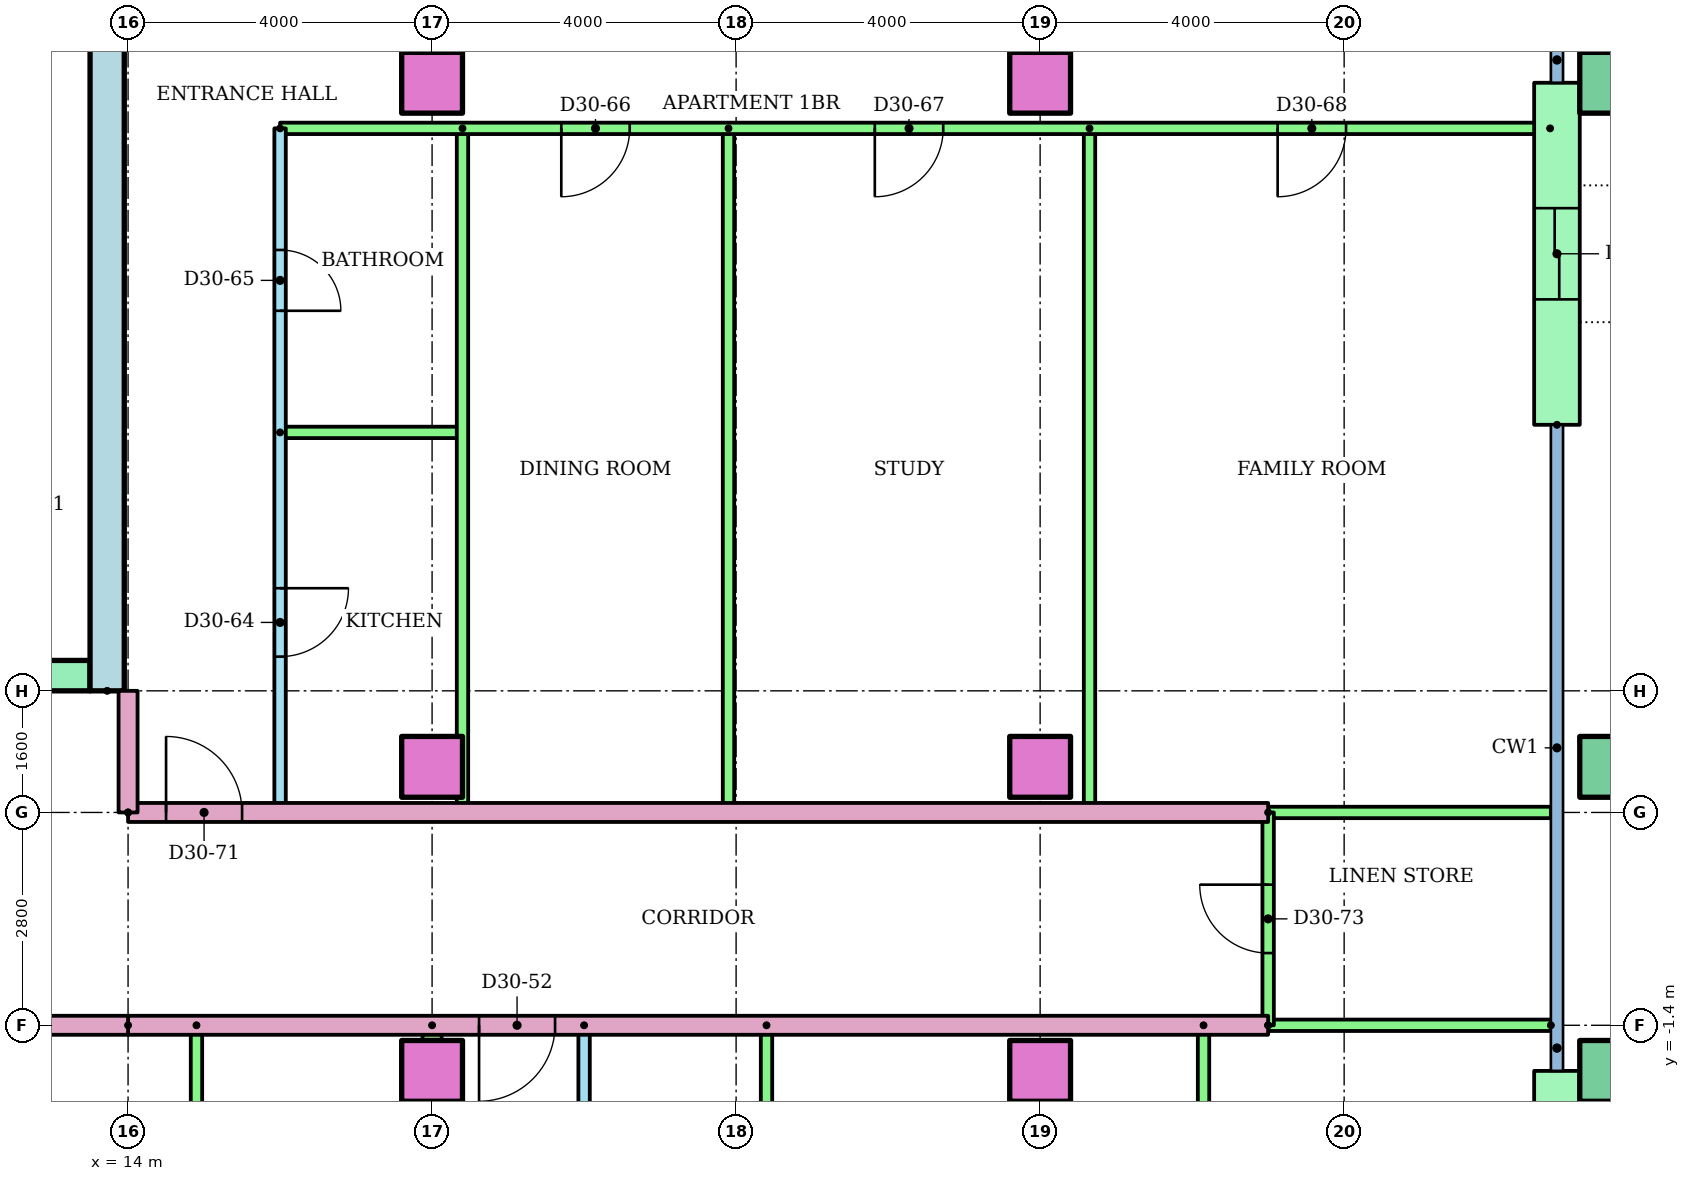
"""IFC4 building model, lengths in metres.
Left out: names, types, materials, properties, quantities, classifications, styles, units other than length and angle.
Written with IfcOpenShell. Run it as: python <this file> out.ifc"""

import sys

from ifc_helpers import new_model, si_unit, direction, frame, frame_2d, origin, origin_2d, place, context, subcontext, project, spatial, rectangle, hollow_rectangle, extrude, element, fill, save


model = new_model("IFC4")
c1 = context("Model", 3, precision=1e-05, world=origin(), true_north=direction((0.0, 1.0)))
c2 = subcontext(c1, "Body", "Model", "MODEL_VIEW")
j1 = project(units=[si_unit("LENGTHUNIT", "METRE"), si_unit("PLANEANGLEUNIT", "RADIAN")], contexts=[c1])
p1 = place(None, origin())
s1 = spatial("IfcSite", under=j1, at=p1, CompositionType="ELEMENT")
p2 = place(p1, origin())
s2 = spatial("IfcBuilding", under=s1, at=p2, CompositionType="ELEMENT")
p3 = place(p2, frame((0.0, 0.0, 119.8)))
s3 = spatial("IfcBuildingStorey", under=s2, at=p3, CompositionType="ELEMENT", Elevation=119.8)
for number, where in (
    (1, (18.0, -2.0, 0.0)),
    (2, (26.0, -2.0, 0.0)),
):
    element("IfcColumn", number, at=place(p3, frame(where)), inside=s3, PredefinedType="COLUMN", context=c2, shape_type="SweptSolid", body=[
        extrude(rectangle(XDim=0.8, YDim=0.8, at=origin_2d()), origin(), (0.0, 0.0, 1.0), 3.2),
    ])
p4 = place(p3, frame((33.5, -2.0, 0.0)))
e3 = element("IfcColumn", 3, at=p4, inside=s3, PredefinedType="COLUMN", context=c2, shape_type="SweptSolid", body=[
    extrude(hollow_rectangle(XDim=0.8, YDim=0.8, WallThickness=0.04, at=origin_2d()), origin(), (0.0, 0.0, 1.0), 3.2),
])
for number, where in (
    (4, (18.0, 2.0, 0.0)),
    (5, (26.0, 2.0, 0.0)),
):
    element("IfcColumn", number, at=place(p3, frame(where)), inside=s3, PredefinedType="COLUMN", context=c2, shape_type="SweptSolid", body=[
        extrude(rectangle(XDim=0.8, YDim=0.8, at=origin_2d()), origin(), (0.0, 0.0, 1.0), 3.2),
    ])
p5 = place(p3, frame((33.5, 2.0, 0.0)))
e6 = element("IfcColumn", 6, at=p5, inside=s3, PredefinedType="COLUMN", context=c2, shape_type="SweptSolid", body=[
    extrude(hollow_rectangle(XDim=0.8, YDim=0.8, WallThickness=0.04, at=origin_2d()), origin(), (0.0, 0.0, 1.0), 3.2),
])
for number, where in (
    (7, (18.0, 11.0, 0.0)),
    (8, (26.0, 11.0, 0.0)),
):
    element("IfcColumn", number, at=place(p3, frame(where)), inside=s3, PredefinedType="COLUMN", context=c2, shape_type="SweptSolid", body=[
        extrude(rectangle(XDim=0.8, YDim=0.8, at=origin_2d()), origin(), (0.0, 0.0, 1.0), 3.2),
    ])
p6 = place(p3, frame((33.5, 11.0, 0.0)))
e9 = element("IfcColumn", 9, at=p6, inside=s3, PredefinedType="COLUMN", context=c2, shape_type="SweptSolid", body=[
    extrude(hollow_rectangle(XDim=0.8, YDim=0.8, WallThickness=0.04, at=origin_2d()), origin(), (0.0, 0.0, 1.0), 3.2),
])
p7 = place(p3, frame((32.8, -5.7, 0.0), z_axis=(0.0, 0.0, 1.0), x_axis=(0.0, 1.0, 0.0)))
e10 = element("IfcWall", 10, at=p7, inside=s3, PredefinedType="STANDARD", context=c2, shape_type="SweptSolid", body=[
    extrude(rectangle(XDim=3.7, YDim=0.6, at=frame_2d((1.85, 0.0))), origin(), (0.0, 0.0, 1.0), 2.92),
])
p8 = place(p7, frame((1.25, 0.0, 0.0)))
e11 = element("IfcOpeningElement", 11, at=p8, cuts=e10, PredefinedType="OPENING", context=c2, shape_type="SweptSolid", body=[
    extrude(rectangle(XDim=1.2, YDim=2.1, at=frame_2d((0.6, 1.05))), frame((0.0, 0.31, 0.0), z_axis=(0.0, -1.0, 0.0), x_axis=(1.0, 0.0, 0.0)), (0.0, 0.0, 1.0), 0.62),
])
p9 = place(p3, frame((32.8, 6.5, 0.0), z_axis=(0.0, 0.0, 1.0), x_axis=(0.0, 1.0, 0.0)))
e12 = element("IfcWall", 12, at=p9, inside=s3, PredefinedType="STANDARD", context=c2, shape_type="SweptSolid", body=[
    extrude(rectangle(XDim=4.5, YDim=0.6, at=frame_2d((2.25, 0.0))), origin(), (0.0, 0.0, 1.0), 2.92),
])
p10 = place(p9, frame((1.65, 0.0, 0.0)))
e13 = element("IfcOpeningElement", 13, at=p10, cuts=e12, PredefinedType="OPENING", context=c2, shape_type="SweptSolid", body=[
    extrude(rectangle(XDim=1.2, YDim=2.1, at=frame_2d((0.6, 1.05))), frame((0.0, 0.31, 0.0), z_axis=(0.0, -1.0, 0.0), x_axis=(1.0, 0.0, 0.0)), (0.0, 0.0, 1.0), 0.62),
])
p11 = place(p3, frame((13.725, 3.0, 0.0), z_axis=(0.0, 0.0, 1.0), x_axis=(0.0, 1.0, 0.0)))
e14 = element("IfcWall", 14, at=p11, inside=s3, PredefinedType="SHEAR", context=c2, shape_type="SweptSolid", body=[
    extrude(rectangle(XDim=17.0, YDim=0.45, at=frame_2d((8.5, 0.0))), origin(), (0.0, 0.0, 1.0), 2.92),
])
p12 = place(p3, frame((-13.5, 3.2, 0.0)))
e15 = element("IfcWall", 15, at=p12, inside=s3, PredefinedType="SHEAR", context=c2, shape_type="SweptSolid", body=[
    extrude(rectangle(XDim=27.0, YDim=0.4, at=frame_2d((13.5, 0.0))), origin(), (0.0, 0.0, 1.0), 2.92),
])
p13 = place(p12, frame((6.861, 0.0, 0.0)))
e16 = element("IfcOpeningElement", 16, at=p13, cuts=e15, PredefinedType="OPENING", context=c2, shape_type="SweptSolid", body=[
    extrude(rectangle(XDim=1.1, YDim=2.1, at=frame_2d((0.55, 1.05))), frame((0.0, 0.21, 0.0), z_axis=(0.0, -1.0, 0.0), x_axis=(1.0, 0.0, 0.0)), (0.0, 0.0, 1.0), 0.42),
])
p14 = place(p12, frame((9.906, 0.0, 0.0)))
e17 = element("IfcOpeningElement", 17, at=p14, cuts=e15, PredefinedType="OPENING", context=c2, shape_type="SweptSolid", body=[
    extrude(rectangle(XDim=1.1, YDim=2.1, at=frame_2d((0.55, 1.05))), frame((0.0, 0.21, 0.0), z_axis=(0.0, -1.0, 0.0), x_axis=(1.0, 0.0, 0.0)), (0.0, 0.0, 1.0), 0.42),
])
p15 = place(p12, frame((15.994, 0.0, 0.0)))
e18 = element("IfcOpeningElement", 18, at=p15, cuts=e15, PredefinedType="OPENING", context=c2, shape_type="SweptSolid", body=[
    extrude(rectangle(XDim=1.1, YDim=2.1, at=frame_2d((0.55, 1.05))), frame((0.0, 0.21, 0.0), z_axis=(0.0, -1.0, 0.0), x_axis=(1.0, 0.0, 0.0)), (0.0, 0.0, 1.0), 0.42),
])
p16 = place(p12, frame((19.039, 0.0, 0.0)))
e19 = element("IfcOpeningElement", 19, at=p16, cuts=e15, PredefinedType="OPENING", context=c2, shape_type="SweptSolid", body=[
    extrude(rectangle(XDim=1.1, YDim=2.1, at=frame_2d((0.55, 1.05))), frame((0.0, 0.21, 0.0), z_axis=(0.0, -1.0, 0.0), x_axis=(1.0, 0.0, 0.0)), (0.0, 0.0, 1.0), 0.42),
])
p17 = place(p12, frame((12.6, 0.0, 0.0)))
e20 = element("IfcOpeningElement", 20, at=p17, cuts=e15, PredefinedType="OPENING", context=c2, shape_type="SweptSolid", body=[
    extrude(rectangle(XDim=1.8, YDim=2.1, at=frame_2d((0.9, 1.05))), frame((0.0, 0.21, 0.0), z_axis=(0.0, -1.0, 0.0), x_axis=(1.0, 0.0, 0.0)), (0.0, 0.0, 1.0), 0.42),
])
p18 = place(p3, frame((14.9, -1.4, 0.0), z_axis=(0.0, 0.0, 1.0), x_axis=(0.0, -1.0, 0.0)))
e21 = element("IfcWall", 21, at=p18, inside=s3, PredefinedType="PARTITIONING", context=c2, shape_type="SweptSolid", body=[
    extrude(rectangle(XDim=6.6, YDim=0.15, at=frame_2d((3.3, 0.0))), origin(), (0.0, 0.0, 1.0), 2.4),
])
p19 = place(p3, frame((20.0, -1.4, 0.0), z_axis=(0.0, 0.0, 1.0), x_axis=(0.0, -1.0, 0.0)))
e22 = element("IfcWall", 22, at=p19, inside=s3, PredefinedType="PARTITIONING", context=c2, shape_type="SweptSolid", body=[
    extrude(rectangle(XDim=6.6, YDim=0.15, at=frame_2d((3.3, 0.0))), origin(), (0.0, 0.0, 1.0), 2.4),
])
p20 = place(p19, frame((1.425, 0.0, 0.0)))
e23 = element("IfcOpeningElement", 23, at=p20, cuts=e22, PredefinedType="OPENING", context=c2, shape_type="SweptSolid", body=[
    extrude(rectangle(XDim=0.9, YDim=2.1, at=frame_2d((0.45, 1.05))), frame((0.0, 0.085, 0.0), z_axis=(0.0, -1.0, 0.0), x_axis=(1.0, 0.0, 0.0)), (0.0, 0.0, 1.0), 0.17),
])
p21 = place(p19, frame((4.775, 0.0, 0.0)))
e24 = element("IfcOpeningElement", 24, at=p21, cuts=e22, PredefinedType="OPENING", context=c2, shape_type="SweptSolid", body=[
    extrude(rectangle(XDim=0.8, YDim=2.1, at=frame_2d((0.4, 1.05))), frame((0.0, 0.085, 0.0), z_axis=(0.0, -1.0, 0.0), x_axis=(1.0, 0.0, 0.0)), (0.0, 0.0, 1.0), 0.17),
])
for number, where, z_axis, x_axis in (
    (25, (22.4, -1.4, 0.0), (0.0, 0.0, 1.0), (0.0, -1.0, 0.0)),
    (26, (28.15, -1.4, 0.0), (0.0, 0.0, 1.0), (0.0, -1.0, 0.0)),
):
    element("IfcWall", number, at=place(p3, frame(where, z_axis=z_axis, x_axis=x_axis)), inside=s3, PredefinedType="PARTITIONING", context=c2, shape_type="SweptSolid", body=[
        extrude(rectangle(XDim=6.6, YDim=0.15, at=frame_2d((3.3, 0.0))), origin(), (0.0, 0.0, 1.0), 2.4),
    ])
p22 = place(p3, frame((18.0, -1.4, 0.0), z_axis=(0.0, 0.0, 1.0), x_axis=(0.0, -1.0, 0.0)))
e27 = element("IfcWall", 27, at=p22, inside=s3, PredefinedType="PARTITIONING", context=c2, shape_type="SweptSolid", body=[
    extrude(rectangle(XDim=14.91, YDim=0.25, at=frame_2d((7.455, 0.0))), origin(), (0.0, 0.0, 1.0), 2.4),
])
p23 = place(p3, frame((29.0, -1.4, 0.0), z_axis=(0.0, 0.0, 1.0), x_axis=(-1.0, 0.0, 0.0)))
e28 = element("IfcWall", 28, at=p23, inside=s3, PredefinedType="PARTITIONING", context=c2, shape_type="SweptSolid", body=[
    extrude(rectangle(XDim=15.0, YDim=0.25, at=frame_2d((7.5, 0.0))), origin(), (0.0, 0.0, 1.0), 2.4),
])
p24 = place(p23, frame((9.382, 0.0, 0.0)))
e29 = element("IfcOpeningElement", 29, at=p24, cuts=e28, PredefinedType="OPENING", context=c2, shape_type="SweptSolid", body=[
    extrude(rectangle(XDim=1.0, YDim=2.1, at=frame_2d((0.5, 1.05))), frame((0.0, 0.135, 0.0), z_axis=(0.0, -1.0, 0.0), x_axis=(1.0, 0.0, 0.0)), (0.0, 0.0, 1.0), 0.27),
])
p25 = place(p3, frame((32.72, -1.4, 0.0), z_axis=(0.0, 0.0, 1.0), x_axis=(-1.0, 0.0, 0.0)))
e30 = element("IfcWall", 30, at=p25, inside=s3, PredefinedType="PARTITIONING", context=c2, shape_type="SweptSolid", body=[
    extrude(rectangle(XDim=3.72, YDim=0.15, at=frame_2d((1.86, 0.0))), origin(), (0.0, 0.0, 1.0), 2.4),
])
p26 = place(p3, frame((16.0, 10.4, 0.0), z_axis=(0.0, 0.0, 1.0), x_axis=(0.0, -1.0, 0.0)))
e31 = element("IfcWall", 31, at=p26, inside=s3, PredefinedType="PARTITIONING", context=c2, shape_type="SweptSolid", body=[
    extrude(rectangle(XDim=9.0, YDim=0.15, at=frame_2d((4.5, 0.0))), origin(), (0.0, 0.0, 1.0), 2.4),
])
p27 = place(p26, frame((6.05, 0.0, 0.0)))
e32 = element("IfcOpeningElement", 32, at=p27, cuts=e31, PredefinedType="OPENING", context=c2, shape_type="SweptSolid", body=[
    extrude(rectangle(XDim=0.9, YDim=2.1, at=frame_2d((0.45, 1.05))), frame((0.0, 0.085, 0.0), z_axis=(0.0, -1.0, 0.0), x_axis=(1.0, 0.0, 0.0)), (0.0, 0.0, 1.0), 0.17),
])
p28 = place(p26, frame((1.6, 0.0, 0.0)))
e33 = element("IfcOpeningElement", 33, at=p28, cuts=e31, PredefinedType="OPENING", context=c2, shape_type="SweptSolid", body=[
    extrude(rectangle(XDim=0.8, YDim=2.1, at=frame_2d((0.4, 1.05))), frame((0.0, 0.085, 0.0), z_axis=(0.0, -1.0, 0.0), x_axis=(1.0, 0.0, 0.0)), (0.0, 0.0, 1.0), 0.17),
])
p29 = place(p3, frame((16.0, 6.4, 0.0)))
e34 = element("IfcWall", 34, at=p29, inside=s3, PredefinedType="PARTITIONING", context=c2, shape_type="SweptSolid", body=[
    extrude(rectangle(XDim=2.4, YDim=0.15, at=frame_2d((1.2, 0.0))), origin(), (0.0, 0.0, 1.0), 2.4),
])
for number, where, z_axis, x_axis in (
    (35, (18.4, 10.4, 0.0), (0.0, 0.0, 1.0), (0.0, -1.0, 0.0)),
    (36, (21.9, 10.4, 0.0), (0.0, 0.0, 1.0), (0.0, -1.0, 0.0)),
    (37, (26.65, 10.4, 0.0), (0.0, 0.0, 1.0), (0.0, -1.0, 0.0)),
):
    element("IfcWall", number, at=place(p3, frame(where, z_axis=z_axis, x_axis=x_axis)), inside=s3, PredefinedType="PARTITIONING", context=c2, shape_type="SweptSolid", body=[
        extrude(rectangle(XDim=9.0, YDim=0.15, at=frame_2d((4.5, 0.0))), origin(), (0.0, 0.0, 1.0), 2.4),
    ])
p30 = place(p3, frame((32.71, 10.4, 0.0), z_axis=(0.0, 0.0, 1.0), x_axis=(-1.0, 0.0, 0.0)))
e38 = element("IfcWall", 38, at=p30, inside=s3, PredefinedType="PARTITIONING", context=c2, shape_type="SweptSolid", body=[
    extrude(rectangle(XDim=16.71, YDim=0.15, at=frame_2d((8.355, 0.0))), origin(), (0.0, 0.0, 1.0), 2.4),
])
p31 = place(p30, frame((12.11, 0.0, 0.0)))
e39 = element("IfcOpeningElement", 39, at=p31, cuts=e38, PredefinedType="OPENING", context=c2, shape_type="SweptSolid", body=[
    extrude(rectangle(XDim=0.9, YDim=2.1, at=frame_2d((0.45, 1.05))), frame((0.0, 0.085, 0.0), z_axis=(0.0, -1.0, 0.0), x_axis=(1.0, 0.0, 0.0)), (0.0, 0.0, 1.0), 0.17),
])
p32 = place(p30, frame((7.985, 0.0, 0.0)))
e40 = element("IfcOpeningElement", 40, at=p32, cuts=e38, PredefinedType="OPENING", context=c2, shape_type="SweptSolid", body=[
    extrude(rectangle(XDim=0.9, YDim=2.1, at=frame_2d((0.45, 1.05))), frame((0.0, 0.085, 0.0), z_axis=(0.0, -1.0, 0.0), x_axis=(1.0, 0.0, 0.0)), (0.0, 0.0, 1.0), 0.17),
])
p33 = place(p30, frame((2.685, 0.0, 0.0)))
e41 = element("IfcOpeningElement", 41, at=p33, cuts=e38, PredefinedType="OPENING", context=c2, shape_type="SweptSolid", body=[
    extrude(rectangle(XDim=0.9, YDim=2.1, at=frame_2d((0.45, 1.05))), frame((0.0, 0.085, 0.0), z_axis=(0.0, -1.0, 0.0), x_axis=(1.0, 0.0, 0.0)), (0.0, 0.0, 1.0), 0.17),
])
p34 = place(p3, frame((14.0, 1.4, 0.0)))
e42 = element("IfcWall", 42, at=p34, inside=s3, PredefinedType="PARTITIONING", context=c2, shape_type="SweptSolid", body=[
    extrude(rectangle(XDim=15.0, YDim=0.25, at=frame_2d((7.5, 0.0))), origin(), (0.0, 0.0, 1.0), 2.4),
])
p35 = place(p34, frame((0.5, 0.0, 0.0)))
e43 = element("IfcOpeningElement", 43, at=p35, cuts=e42, PredefinedType="OPENING", context=c2, shape_type="SweptSolid", body=[
    extrude(rectangle(XDim=1.0, YDim=2.1, at=frame_2d((0.5, 1.05))), frame((0.0, 0.135, 0.0), z_axis=(0.0, -1.0, 0.0), x_axis=(1.0, 0.0, 0.0)), (0.0, 0.0, 1.0), 0.27),
])
p36 = place(p3, frame((29.0, 1.4, 0.0)))
e44 = element("IfcWall", 44, at=p36, inside=s3, PredefinedType="PARTITIONING", context=c2, shape_type="SweptSolid", body=[
    extrude(rectangle(XDim=3.72, YDim=0.15, at=frame_2d((1.86, 0.0))), origin(), (0.0, 0.0, 1.0), 2.4),
])
p37 = place(p3, frame((29.0, -1.4, 0.0), z_axis=(0.0, 0.0, 1.0), x_axis=(0.0, 1.0, 0.0)))
e45 = element("IfcWall", 45, at=p37, inside=s3, PredefinedType="PARTITIONING", context=c2, shape_type="SweptSolid", body=[
    extrude(rectangle(XDim=2.8, YDim=0.15, at=frame_2d((1.4, 0.0))), origin(), (0.0, 0.0, 1.0), 2.4),
])
p38 = place(p37, frame((0.95, 0.0, 0.0)))
e46 = element("IfcOpeningElement", 46, at=p38, cuts=e45, PredefinedType="OPENING", context=c2, shape_type="SweptSolid", body=[
    extrude(rectangle(XDim=0.9, YDim=2.1, at=frame_2d((0.45, 1.05))), frame((0.0, 0.085, 0.0), z_axis=(0.0, -1.0, 0.0), x_axis=(1.0, 0.0, 0.0)), (0.0, 0.0, 1.0), 0.17),
])
p39 = place(p3, frame((14.0, -1.4, 0.0), z_axis=(0.0, 0.0, 1.0), x_axis=(-1.0, 0.0, 0.0)))
e47 = element("IfcWall", 47, at=p39, inside=s3, PredefinedType="PARTITIONING", context=c2, shape_type="SweptSolid", body=[
    extrude(rectangle(XDim=28.0, YDim=0.25, at=frame_2d((14.0, 0.0))), origin(), (0.0, 0.0, 1.0), 2.4),
])
p40 = place(p39, frame((12.618, 0.0, 0.0)))
e48 = element("IfcOpeningElement", 48, at=p40, cuts=e47, PredefinedType="OPENING", context=c2, shape_type="SweptSolid", body=[
    extrude(rectangle(XDim=1.0, YDim=2.1, at=frame_2d((0.5, 1.05))), frame((0.0, 0.135, 0.0), z_axis=(0.0, -1.0, 0.0), x_axis=(1.0, 0.0, 0.0)), (0.0, 0.0, 1.0), 0.27),
])
p41 = place(p39, frame((10.382, 0.0, 0.0)))
e49 = element("IfcOpeningElement", 49, at=p41, cuts=e47, PredefinedType="OPENING", context=c2, shape_type="SweptSolid", body=[
    extrude(rectangle(XDim=1.0, YDim=2.1, at=frame_2d((0.5, 1.05))), frame((0.0, 0.135, 0.0), z_axis=(0.0, -1.0, 0.0), x_axis=(1.0, 0.0, 0.0)), (0.0, 0.0, 1.0), 0.27),
])
p42 = place(p3, frame((14.0, 1.4, 0.0), z_axis=(0.0, 0.0, 1.0), x_axis=(0.0, 1.0, 0.0)))
e50 = element("IfcWall", 50, at=p42, inside=s3, PredefinedType="PARTITIONING", context=c2, shape_type="SweptSolid", body=[
    extrude(rectangle(XDim=1.6, YDim=0.25, at=frame_2d((0.8, 0.0))), origin(), (0.0, 0.0, 1.0), 2.4),
])
p43 = place(p24, origin())
e51 = element("IfcDoor", 51, at=p43, inside=s3, OperationType="SINGLE_SWING_RIGHT", PredefinedType="DOOR", context=c2, shape_type="SweptSolid", body=[
    extrude(rectangle(XDim=1.0, YDim=2.1, at=frame_2d((0.5, 1.05))), frame((0.0, 0.025, 0.0), z_axis=(0.0, -1.0, 0.0), x_axis=(1.0, 0.0, 0.0)), (0.0, 0.0, 1.0), 0.05),
])
fill(e29, e51)
p44 = place(p27, origin())
e52 = element("IfcDoor", 52, at=p44, inside=s3, OperationType="SINGLE_SWING_LEFT", PredefinedType="DOOR", context=c2, shape_type="SweptSolid", body=[
    extrude(rectangle(XDim=0.9, YDim=2.1, at=frame_2d((0.45, 1.05))), frame((0.0, 0.025, 0.0), z_axis=(0.0, -1.0, 0.0), x_axis=(1.0, 0.0, 0.0)), (0.0, 0.0, 1.0), 0.05),
])
fill(e32, e52)
p45 = place(p28, origin())
e53 = element("IfcDoor", 53, at=p45, inside=s3, OperationType="SINGLE_SWING_RIGHT", PredefinedType="DOOR", context=c2, shape_type="SweptSolid", body=[
    extrude(rectangle(XDim=0.8, YDim=2.1, at=frame_2d((0.4, 1.05))), frame((0.0, 0.025, 0.0), z_axis=(0.0, -1.0, 0.0), x_axis=(1.0, 0.0, 0.0)), (0.0, 0.0, 1.0), 0.05),
])
fill(e33, e53)
p46 = place(p31, origin())
e54 = element("IfcDoor", 54, at=p46, inside=s3, OperationType="SINGLE_SWING_RIGHT", PredefinedType="DOOR", context=c2, shape_type="SweptSolid", body=[
    extrude(rectangle(XDim=0.9, YDim=2.1, at=frame_2d((0.45, 1.05))), frame((0.0, 0.025, 0.0), z_axis=(0.0, -1.0, 0.0), x_axis=(1.0, 0.0, 0.0)), (0.0, 0.0, 1.0), 0.05),
])
fill(e39, e54)
p47 = place(p32, origin())
e55 = element("IfcDoor", 55, at=p47, inside=s3, OperationType="SINGLE_SWING_RIGHT", PredefinedType="DOOR", context=c2, shape_type="SweptSolid", body=[
    extrude(rectangle(XDim=0.9, YDim=2.1, at=frame_2d((0.45, 1.05))), frame((0.0, 0.025, 0.0), z_axis=(0.0, -1.0, 0.0), x_axis=(1.0, 0.0, 0.0)), (0.0, 0.0, 1.0), 0.05),
])
fill(e40, e55)
p48 = place(p33, origin())
e56 = element("IfcDoor", 56, at=p48, inside=s3, OperationType="SINGLE_SWING_RIGHT", PredefinedType="DOOR", context=c2, shape_type="SweptSolid", body=[
    extrude(rectangle(XDim=0.9, YDim=2.1, at=frame_2d((0.45, 1.05))), frame((0.0, 0.025, 0.0), z_axis=(0.0, -1.0, 0.0), x_axis=(1.0, 0.0, 0.0)), (0.0, 0.0, 1.0), 0.05),
])
fill(e41, e56)
p49 = place(p35, origin())
e57 = element("IfcDoor", 57, at=p49, inside=s3, OperationType="SINGLE_SWING_LEFT", PredefinedType="DOOR", context=c2, shape_type="SweptSolid", body=[
    extrude(rectangle(XDim=1.0, YDim=2.1, at=frame_2d((0.5, 1.05))), frame((0.0, 0.025, 0.0), z_axis=(0.0, -1.0, 0.0), x_axis=(1.0, 0.0, 0.0)), (0.0, 0.0, 1.0), 0.05),
])
fill(e43, e57)
p50 = place(p38, origin())
e58 = element("IfcDoor", 58, at=p50, inside=s3, OperationType="SINGLE_SWING_RIGHT", PredefinedType="DOOR", context=c2, shape_type="SweptSolid", body=[
    extrude(rectangle(XDim=0.9, YDim=2.1, at=frame_2d((0.45, 1.05))), frame((0.0, 0.025, 0.0), z_axis=(0.0, -1.0, 0.0), x_axis=(1.0, 0.0, 0.0)), (0.0, 0.0, 1.0), 0.05),
])
fill(e46, e58)
p51 = place(p10, origin())
e59 = element("IfcDoor", 59, at=p51, inside=s3, OperationType="SLIDING_TO_LEFT", PredefinedType="DOOR", context=c2, shape_type="SweptSolid", body=[
    extrude(rectangle(XDim=1.2, YDim=2.1, at=frame_2d((0.6, 1.05))), frame((0.0, 0.025, 0.0), z_axis=(0.0, -1.0, 0.0), x_axis=(1.0, 0.0, 0.0)), (0.0, 0.0, 1.0), 0.05),
])
fill(e13, e59)
save(model, sys.argv[1])
